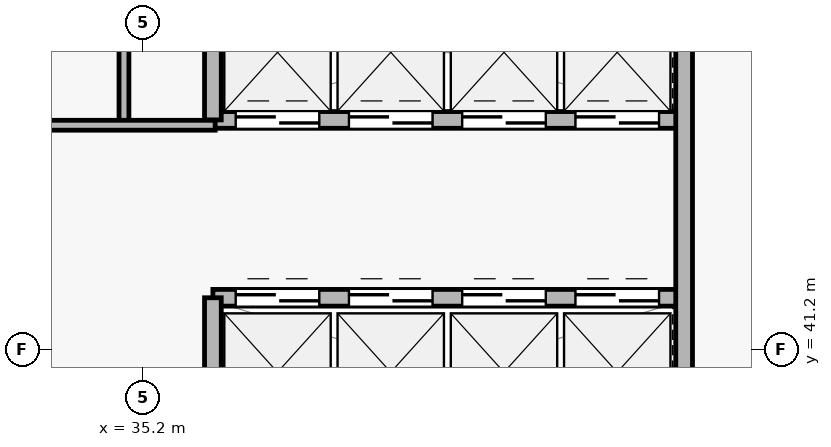
"""IFC4 building model, lengths in metres.
Left out: names, types, materials, properties, quantities, classifications, styles, units other than length and angle.
Written with IfcOpenShell. Run it as: python <this file> out.ifc"""

import sys

from ifc_helpers import new_model, si_unit, direction, frame, frame_2d, origin, place, context, subcontext, project, spatial, rectangle, extrude, source, transform, mapped, element, fill, save


model = new_model("IFC4")
c1 = context("Model", 3, precision=1e-05, world=origin(), true_north=direction((0.0, 1.0)))
c2 = subcontext(c1, "Body", "Model", "MODEL_VIEW")
j1 = project(units=[si_unit("LENGTHUNIT", "METRE"), si_unit("PLANEANGLEUNIT", "RADIAN")], contexts=[c1])
p1 = place(None, origin())
s1 = spatial("IfcSite", under=j1, at=p1, CompositionType="ELEMENT")
p2 = place(p1, origin())
s2 = spatial("IfcBuilding", under=s1, at=p2, CompositionType="ELEMENT")
p3 = place(p2, frame((0.0, 0.0, 220.2)))
s3 = spatial("IfcBuildingStorey", under=s2, at=p3, CompositionType="ELEMENT", Elevation=220.2)
p4 = place(p3, frame((36.12, 44.22, 0.0), z_axis=(0.0, 0.0, 1.0), x_axis=(1.0, 0.0, 0.0)))
e1 = element("IfcWall", 1, at=p4, inside=s3, PredefinedType="SOLIDWALL", context=c2, shape_type="SweptSolid", body=[
    extrude(rectangle(XDim=6.2, YDim=0.22, at=frame_2d((3.1, 0.0))), origin(), (0.0, 0.0, 1.0), 6.585),
])
p5 = place(p4, frame((0.3, 0.0, 0.0)))
e2 = element("IfcOpeningElement", 2, at=p5, cuts=e1, PredefinedType="OPENING", context=c2, shape_type="SweptSolid", body=[
    extrude(rectangle(XDim=1.1, YDim=2.2, at=frame_2d((0.55, 1.1))), frame((0.0, 0.12, 0.0), z_axis=(0.0, -1.0, 0.0), x_axis=(1.0, 0.0, 0.0)), (0.0, 0.0, 1.0), 0.24),
])
p6 = place(p4, frame((1.79, 0.0, 0.0)))
e3 = element("IfcOpeningElement", 3, at=p6, cuts=e1, PredefinedType="OPENING", context=c2, shape_type="SweptSolid", body=[
    extrude(rectangle(XDim=1.1, YDim=2.2, at=frame_2d((0.55, 1.1))), frame((0.0, 0.12, 0.0), z_axis=(0.0, -1.0, 0.0), x_axis=(1.0, 0.0, 0.0)), (0.0, 0.0, 1.0), 0.24),
])
p7 = place(p4, frame((3.28, 0.0, 0.0)))
e4 = element("IfcOpeningElement", 4, at=p7, cuts=e1, PredefinedType="OPENING", context=c2, shape_type="SweptSolid", body=[
    extrude(rectangle(XDim=1.1, YDim=2.2, at=frame_2d((0.55, 1.1))), frame((0.0, 0.12, 0.0), z_axis=(0.0, -1.0, 0.0), x_axis=(1.0, 0.0, 0.0)), (0.0, 0.0, 1.0), 0.24),
])
p8 = place(p4, frame((4.77, 0.0, 0.0)))
e5 = element("IfcOpeningElement", 5, at=p8, cuts=e1, PredefinedType="OPENING", context=c2, shape_type="SweptSolid", body=[
    extrude(rectangle(XDim=1.1, YDim=2.2, at=frame_2d((0.55, 1.1))), frame((0.0, 0.12, 0.0), z_axis=(0.0, -1.0, 0.0), x_axis=(1.0, 0.0, 0.0)), (0.0, 0.0, 1.0), 0.24),
])
p9 = place(p3, frame((36.12, 41.88, 0.0), z_axis=(0.0, 0.0, 1.0), x_axis=(1.0, 0.0, 0.0)))
e6 = element("IfcWall", 6, at=p9, inside=s3, PredefinedType="SOLIDWALL", context=c2, shape_type="SweptSolid", body=[
    extrude(rectangle(XDim=6.2, YDim=0.22, at=frame_2d((3.1, 0.0))), origin(), (0.0, 0.0, 1.0), 6.585),
])
p10 = place(p9, frame((0.3, 0.0, 0.0)))
e7 = element("IfcOpeningElement", 7, at=p10, cuts=e6, PredefinedType="OPENING", context=c2, shape_type="SweptSolid", body=[
    extrude(rectangle(XDim=1.1, YDim=2.2, at=frame_2d((0.55, 1.1))), frame((0.0, 0.12, 0.0), z_axis=(0.0, -1.0, 0.0), x_axis=(1.0, 0.0, 0.0)), (0.0, 0.0, 1.0), 0.24),
])
p11 = place(p9, frame((1.79, 0.0, 0.0)))
e8 = element("IfcOpeningElement", 8, at=p11, cuts=e6, PredefinedType="OPENING", context=c2, shape_type="SweptSolid", body=[
    extrude(rectangle(XDim=1.1, YDim=2.2, at=frame_2d((0.55, 1.1))), frame((0.0, 0.12, 0.0), z_axis=(0.0, -1.0, 0.0), x_axis=(1.0, 0.0, 0.0)), (0.0, 0.0, 1.0), 0.24),
])
p12 = place(p9, frame((3.28, 0.0, 0.0)))
e9 = element("IfcOpeningElement", 9, at=p12, cuts=e6, PredefinedType="OPENING", context=c2, shape_type="SweptSolid", body=[
    extrude(rectangle(XDim=1.1, YDim=2.2, at=frame_2d((0.55, 1.1))), frame((0.0, 0.12, 0.0), z_axis=(0.0, -1.0, 0.0), x_axis=(1.0, 0.0, 0.0)), (0.0, 0.0, 1.0), 0.24),
])
p13 = place(p9, frame((4.77, 0.0, 0.0)))
e10 = element("IfcOpeningElement", 10, at=p13, cuts=e6, PredefinedType="OPENING", context=c2, shape_type="SweptSolid", body=[
    extrude(rectangle(XDim=1.1, YDim=2.2, at=frame_2d((0.55, 1.1))), frame((0.0, 0.12, 0.0), z_axis=(0.0, -1.0, 0.0), x_axis=(1.0, 0.0, 0.0)), (0.0, 0.0, 1.0), 0.24),
])
p14 = place(p3, frame((42.32, 39.92, 0.0), z_axis=(0.0, 0.0, 1.0), x_axis=(0.0, 1.0, 0.0)))
e11 = element("IfcWall", 11, at=p14, inside=s3, PredefinedType="SOLIDWALL", context=c2, shape_type="SweptSolid", body=[
    extrude(rectangle(XDim=6.425, YDim=0.22, at=frame_2d((3.212, 0.0))), origin(), (0.0, 0.0, 1.0), 6.585),
])
p15 = place(p3, frame((36.12, 39.92, 0.0), z_axis=(0.0, 0.0, 1.0), x_axis=(0.0, 1.0, 0.0)))
e12 = element("IfcWall", 12, at=p15, inside=s3, PredefinedType="SOLIDWALL", context=c2, shape_type="SweptSolid", body=[
    extrude(rectangle(XDim=1.96, YDim=0.22, at=frame_2d((0.98, 0.0))), origin(), (0.0, 0.0, 1.0), 6.585),
])
p16 = place(p3, frame((36.12, 44.22, 0.0), z_axis=(0.0, 0.0, 1.0), x_axis=(0.0, 1.0, 0.0)))
e13 = element("IfcWall", 13, at=p16, inside=s3, PredefinedType="SOLIDWALL", context=c2, shape_type="SweptSolid", body=[
    extrude(rectangle(XDim=2.125, YDim=0.22, at=frame_2d((1.062, 0.0))), origin(), (0.0, 0.0, 1.0), 6.585),
])
p17 = place(p3, frame((34.95, 44.15, 0.0), z_axis=(0.0, 0.0, 1.0), x_axis=(0.0, 1.0, 0.0)))
e14 = element("IfcWall", 14, at=p17, inside=s3, PredefinedType="PARTITIONING", context=c2, shape_type="SweptSolid", body=[
    extrude(rectangle(XDim=2.195, YDim=0.13, at=frame_2d((1.098, 0.0))), origin(), (0.0, 0.0, 1.0), 6.585),
])
p18 = place(p3, frame((33.18, 44.15, 0.0), z_axis=(0.0, 0.0, 1.0), x_axis=(1.0, 0.0, 0.0)))
e15 = element("IfcWall", 15, at=p18, inside=s3, PredefinedType="PARTITIONING", context=c2, shape_type="SweptSolid", body=[
    extrude(rectangle(XDim=2.97, YDim=0.13, at=frame_2d((1.485, 0.0))), origin(), (0.0, 0.0, 1.0), 5.87),
])
m1 = source(origin(), c2, "Body", "SweptSolid", [
    extrude(rectangle(XDim=1.1, YDim=2.2, at=frame_2d((0.55, 1.1))), frame((0.0, 0.025, 0.0), z_axis=(0.0, -1.0, 0.0), x_axis=(1.0, 0.0, 0.0)), (0.0, 0.0, 1.0), 0.05),
])
p19 = place(p5, origin())
e16 = element("IfcDoor", 16, at=p19, inside=s3, OperationType="SLIDING_TO_LEFT", PredefinedType="DOOR", context=c2, shape_type="MappedRepresentation", body=[
    mapped(m1, transform((0.0, 0.0, 0.0), x_axis=(1.0, 0.0, 0.0), y_axis=(0.0, 1.0, 0.0), z_axis=(0.0, 0.0, 1.0), scale=1.0)),
])
fill(e2, e16)
p20 = place(p6, origin())
e17 = element("IfcDoor", 17, at=p20, inside=s3, OperationType="SLIDING_TO_LEFT", PredefinedType="DOOR", context=c2, shape_type="MappedRepresentation", body=[
    mapped(m1, transform((0.0, 0.0, 0.0), x_axis=(1.0, 0.0, 0.0), y_axis=(0.0, 1.0, 0.0), z_axis=(0.0, 0.0, 1.0), scale=1.0)),
])
fill(e3, e17)
p21 = place(p10, origin())
e18 = element("IfcDoor", 18, at=p21, inside=s3, OperationType="SLIDING_TO_LEFT", PredefinedType="DOOR", context=c2, shape_type="MappedRepresentation", body=[
    mapped(m1, transform((0.0, 0.0, 0.0), x_axis=(1.0, 0.0, 0.0), y_axis=(0.0, 1.0, 0.0), z_axis=(0.0, 0.0, 1.0), scale=1.0)),
])
fill(e7, e18)
p22 = place(p11, origin())
e19 = element("IfcDoor", 19, at=p22, inside=s3, OperationType="SLIDING_TO_LEFT", PredefinedType="DOOR", context=c2, shape_type="MappedRepresentation", body=[
    mapped(m1, transform((0.0, 0.0, 0.0), x_axis=(1.0, 0.0, 0.0), y_axis=(0.0, 1.0, 0.0), z_axis=(0.0, 0.0, 1.0), scale=1.0)),
])
fill(e8, e19)
p23 = place(p7, origin())
e20 = element("IfcDoor", 20, at=p23, inside=s3, OperationType="SLIDING_TO_LEFT", PredefinedType="DOOR", context=c2, shape_type="MappedRepresentation", body=[
    mapped(m1, transform((0.0, 0.0, 0.0), x_axis=(1.0, 0.0, 0.0), y_axis=(0.0, 1.0, 0.0), z_axis=(0.0, 0.0, 1.0), scale=1.0)),
])
fill(e4, e20)
p24 = place(p8, origin())
e21 = element("IfcDoor", 21, at=p24, inside=s3, OperationType="SLIDING_TO_LEFT", PredefinedType="DOOR", context=c2, shape_type="MappedRepresentation", body=[
    mapped(m1, transform((0.0, 0.0, 0.0), x_axis=(1.0, 0.0, 0.0), y_axis=(0.0, 1.0, 0.0), z_axis=(0.0, 0.0, 1.0), scale=1.0)),
])
fill(e5, e21)
p25 = place(p12, origin())
e22 = element("IfcDoor", 22, at=p25, inside=s3, OperationType="SLIDING_TO_LEFT", PredefinedType="DOOR", context=c2, shape_type="MappedRepresentation", body=[
    mapped(m1, transform((0.0, 0.0, 0.0), x_axis=(1.0, 0.0, 0.0), y_axis=(0.0, 1.0, 0.0), z_axis=(0.0, 0.0, 1.0), scale=1.0)),
])
fill(e9, e22)
p26 = place(p13, origin())
e23 = element("IfcDoor", 23, at=p26, inside=s3, OperationType="SLIDING_TO_LEFT", PredefinedType="DOOR", context=c2, shape_type="MappedRepresentation", body=[
    mapped(m1, transform((0.0, 0.0, 0.0), x_axis=(1.0, 0.0, 0.0), y_axis=(0.0, 1.0, 0.0), z_axis=(0.0, 0.0, 1.0), scale=1.0)),
])
fill(e10, e23)
save(model, sys.argv[1])
